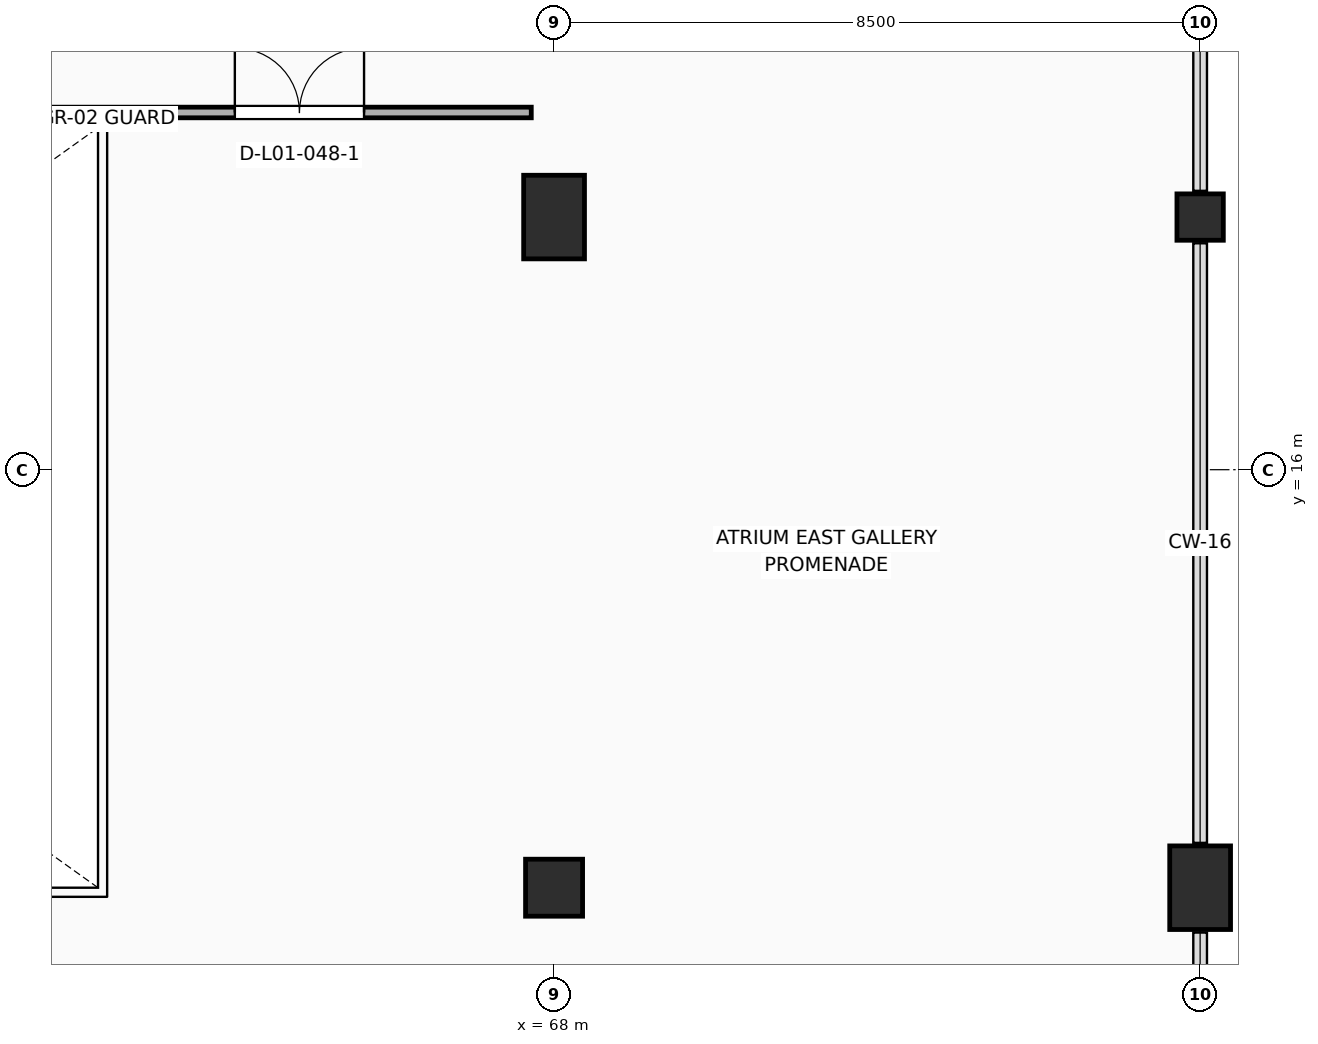
"""IFC4 building model, lengths in metres.
Left out: names, types, materials, properties, quantities, classifications, styles, units other than length and angle.
Written with IfcOpenShell. Run it as: python <this file> out.ifc"""

import sys

from ifc_helpers import new_model, si_unit, direction, frame, frame_2d, origin, origin_2d, place, context, subcontext, project, spatial, rectangle, hollow_circle, extrude, element, fill, save


model = new_model("IFC4")
c1 = context("Model", 3, precision=1e-05, world=origin(), true_north=direction((0.0, 1.0)))
c2 = subcontext(c1, "Body", "Model", "MODEL_VIEW")
j1 = project(units=[si_unit("LENGTHUNIT", "METRE"), si_unit("PLANEANGLEUNIT", "RADIAN")], contexts=[c1])
p1 = place(None, origin())
s1 = spatial("IfcSite", under=j1, at=p1, CompositionType="ELEMENT")
p2 = place(p1, origin())
s2 = spatial("IfcBuilding", under=s1, at=p2, CompositionType="ELEMENT")
p3 = place(p2, frame((0.0, 0.0, 5.4)))
s3 = spatial("IfcBuildingStorey", under=s2, at=p3, CompositionType="ELEMENT", Elevation=5.4)
p4 = place(p3, frame((68.0, 10.5, 0.0), z_axis=(0.0, 0.0, 1.0), x_axis=(1.0, 0.0, 0.0)))
e1 = element("IfcColumn", 1, at=p4, inside=s3, PredefinedType="COLUMN", context=c2, shape_type="SweptSolid", body=[
    extrude(rectangle(XDim=0.75, YDim=0.75, at=origin_2d()), origin(), (0.0, 0.0, 1.0), 4.52),
])
for number, where, z_axis, x_axis in (
    (2, (76.5, 10.5, 0.0), (0.0, 0.0, 1.0), (1.0, 0.0, 0.0)),
    (3, (68.0, 19.324, 0.0), (0.0, 0.0, 1.0), (1.0, 0.0, 0.0)),
):
    element("IfcColumn", number, at=place(p3, frame(where, z_axis=z_axis, x_axis=x_axis)), inside=s3, PredefinedType="COLUMN", context=c2, shape_type="SweptSolid", body=[
        extrude(rectangle(XDim=0.8, YDim=1.1, at=origin_2d()), origin(), (0.0, 0.0, 1.0), 4.52),
    ])
p5 = place(p3, frame((76.5, 19.324, 0.0), z_axis=(0.0, 0.0, 1.0), x_axis=(1.0, 0.0, 0.0)))
e4 = element("IfcColumn", 4, at=p5, inside=s3, PredefinedType="COLUMN", context=c2, shape_type="SweptSolid", body=[
    extrude(hollow_circle(Radius=0.305, WallThickness=0.02, at=origin_2d()), origin(), (0.0, 0.0, 1.0), 4.52),
])
p6 = place(p3, frame((42.8, 20.7, 0.0), z_axis=(0.0, 0.0, 1.0), x_axis=(1.0, 0.0, 0.0)))
e5 = element("IfcWall", 5, at=p6, inside=s3, PredefinedType="PARTITIONING", context=c2, shape_type="SweptSolid", body=[
    extrude(rectangle(XDim=24.9, YDim=0.14, at=frame_2d((12.45, 0.0))), origin(), (0.0, 0.0, 1.0), 3.66),
])
p7 = place(p6, frame((21.0, 0.0, 0.0)))
e6 = element("IfcOpeningElement", 6, at=p7, cuts=e5, PredefinedType="OPENING", context=c2, shape_type="SweptSolid", body=[
    extrude(rectangle(XDim=1.7, YDim=2.35, at=frame_2d((0.85, 1.175))), frame((0.0, 0.082, 0.0), z_axis=(0.0, -1.0, 0.0), x_axis=(1.0, 0.0, 0.0)), (0.0, 0.0, 1.0), 0.164),
])
p8 = place(p6, frame((4.0, 0.0, 1.0)))
e7 = element("IfcOpeningElement", 7, at=p8, cuts=e5, PredefinedType="OPENING", context=c2, shape_type="SweptSolid", body=[
    extrude(rectangle(XDim=2.8, YDim=1.6, at=frame_2d((1.4, 0.8))), frame((0.0, 0.082, 0.0), z_axis=(0.0, -1.0, 0.0), x_axis=(1.0, 0.0, 0.0)), (0.0, 0.0, 1.0), 0.164),
])
p9 = place(p7, origin())
e8 = element("IfcDoor", 8, at=p9, inside=s3, OperationType="DOUBLE_DOOR_SINGLE_SWING", PredefinedType="DOOR", context=c2, shape_type="SweptSolid", body=[
    extrude(rectangle(XDim=1.7, YDim=2.35, at=frame_2d((0.85, 1.175))), frame((0.0, 0.025, 0.0), z_axis=(0.0, -1.0, 0.0), x_axis=(1.0, 0.0, 0.0)), (0.0, 0.0, 1.0), 0.05),
])
fill(e6, e8)
save(model, sys.argv[1])
